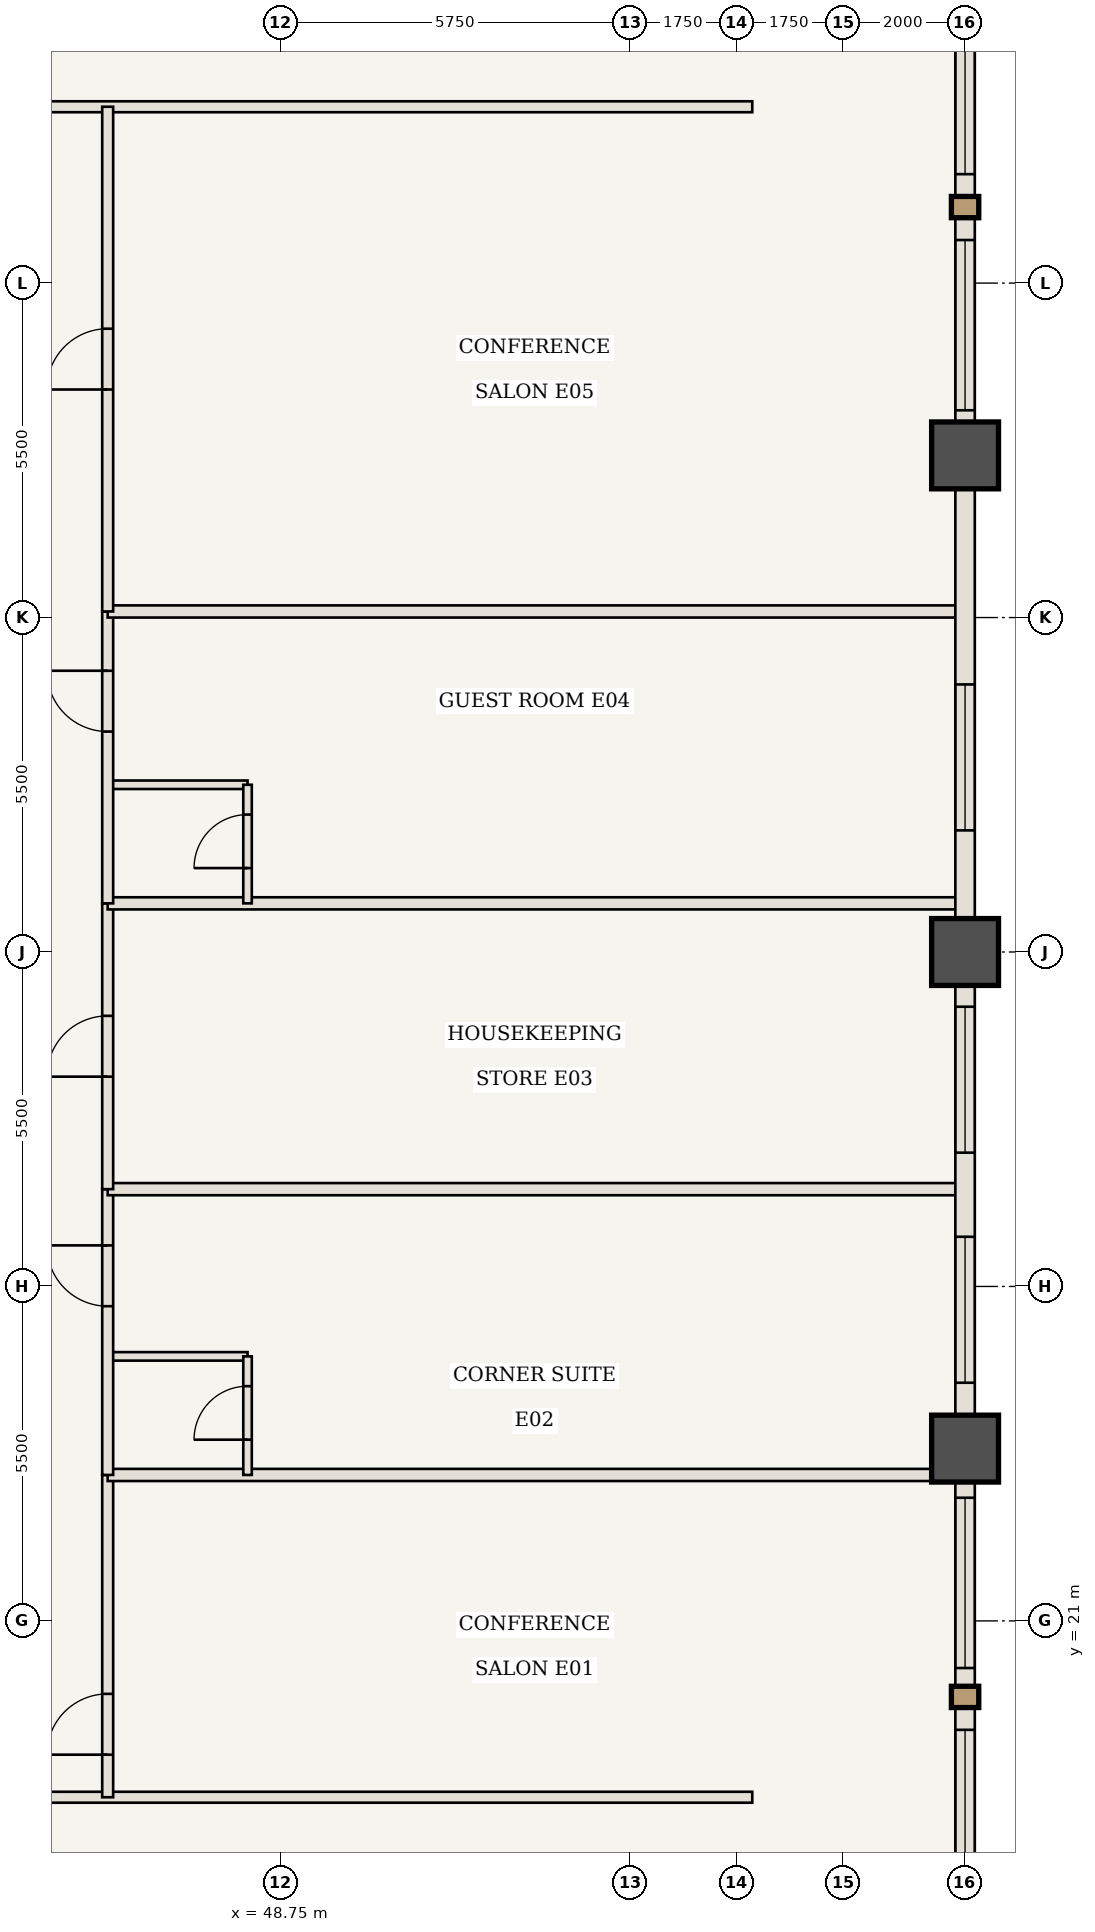
"""IFC4 building model, lengths in metres.
Left out: names, types, materials, properties, quantities, classifications, styles, units other than length and angle.
Written with IfcOpenShell. Run it as: python <this file> out.ifc"""

import sys

from ifc_helpers import new_model, si_unit, direction, frame, frame_2d, origin, origin_2d, place, context, subcontext, project, spatial, rectangle, extrude, element, fill, save


model = new_model("IFC4")
c1 = context("Model", 3, precision=1e-05, world=origin(), true_north=direction((0.0, 1.0)))
c2 = subcontext(c1, "Body", "Model", "MODEL_VIEW")
j1 = project(units=[si_unit("LENGTHUNIT", "METRE"), si_unit("PLANEANGLEUNIT", "RADIAN")], contexts=[c1])
p1 = place(None, origin())
s1 = spatial("IfcSite", under=j1, at=p1, CompositionType="ELEMENT")
p2 = place(p1, origin())
s2 = spatial("IfcBuilding", under=s1, at=p2, CompositionType="ELEMENT")
p3 = place(p2, frame((0.0, 0.0, 52.85)))
s3 = spatial("IfcBuildingStorey", under=s2, at=p3, CompositionType="ELEMENT", Elevation=52.85)
for number, where, z_axis, x_axis in (
    (1, (60.0, 23.833, 0.0), (0.0, 0.0, 1.0), (1.0, 0.0, 0.0)),
    (2, (60.0, 32.0, 0.0), (0.0, 0.0, 1.0), (1.0, 0.0, 0.0)),
    (3, (60.0, 40.167, 0.0), (0.0, 0.0, 1.0), (1.0, 0.0, 0.0)),
):
    element("IfcColumn", number, at=place(p3, frame(where, z_axis=z_axis, x_axis=x_axis)), inside=s3, PredefinedType="COLUMN", context=c2, shape_type="SweptSolid", body=[
        extrude(rectangle(XDim=1.1, YDim=1.1, at=origin_2d()), origin(), (0.0, 0.0, 1.0), 3.5),
    ])
p4 = place(p3, frame((34.5, 18.1, 0.0), z_axis=(0.0, 0.0, 1.0), x_axis=(1.0, 0.0, 0.0)))
e4 = element("IfcWall", 4, at=p4, inside=s3, PredefinedType="STANDARD", context=c2, shape_type="SweptSolid", body=[
    extrude(rectangle(XDim=22.0, YDim=0.18, at=frame_2d((11.0, 0.0))), origin(), (0.0, 0.0, 1.0), 3.32),
])
p5 = place(p4, frame((5.175, 0.0, 0.0)))
e5 = element("IfcOpeningElement", 5, at=p5, cuts=e4, PredefinedType="OPENING", context=c2, shape_type="SweptSolid", body=[
    extrude(rectangle(XDim=1.0, YDim=2.15, at=frame_2d((0.5, 1.075))), frame((0.0, 0.1, 0.0), z_axis=(0.0, -1.0, 0.0), x_axis=(1.0, 0.0, 0.0)), (0.0, 0.0, 1.0), 0.2),
])
p6 = place(p3, frame((38.0, 45.9, 0.0), z_axis=(0.0, 0.0, 1.0), x_axis=(1.0, 0.0, 0.0)))
e6 = element("IfcWall", 6, at=p6, inside=s3, PredefinedType="STANDARD", context=c2, shape_type="SweptSolid", body=[
    extrude(rectangle(XDim=18.5, YDim=0.18, at=frame_2d((9.25, 0.0))), origin(), (0.0, 0.0, 1.0), 3.32),
])
p7 = place(p6, frame((4.875, 0.0, 0.0)))
e7 = element("IfcOpeningElement", 7, at=p7, cuts=e6, PredefinedType="OPENING", context=c2, shape_type="SweptSolid", body=[
    extrude(rectangle(XDim=1.0, YDim=2.15, at=frame_2d((0.5, 1.075))), frame((0.0, 0.1, 0.0), z_axis=(0.0, -1.0, 0.0), x_axis=(1.0, 0.0, 0.0)), (0.0, 0.0, 1.0), 0.2),
])
p8 = place(p3, frame((45.9, 18.1, 0.0), z_axis=(0.0, 0.0, 1.0), x_axis=(0.0, 1.0, 0.0)))
e8 = element("IfcWall", 8, at=p8, inside=s3, PredefinedType="STANDARD", context=c2, shape_type="SweptSolid", body=[
    extrude(rectangle(XDim=5.3, YDim=0.18, at=frame_2d((2.65, 0.0))), origin(), (0.0, 0.0, 1.0), 3.32),
])
p9 = place(p8, frame((0.7, 0.0, 0.0)))
e9 = element("IfcOpeningElement", 9, at=p9, cuts=e8, PredefinedType="OPENING", context=c2, shape_type="SweptSolid", body=[
    extrude(rectangle(XDim=1.0, YDim=2.15, at=frame_2d((0.5, 1.075))), frame((0.0, 0.1, 0.0), z_axis=(0.0, -1.0, 0.0), x_axis=(1.0, 0.0, 0.0)), (0.0, 0.0, 1.0), 0.2),
])
p10 = place(p3, frame((45.9, 23.4, 0.0), z_axis=(0.0, 0.0, 1.0), x_axis=(1.0, 0.0, 0.0)))
e10 = element("IfcWall", 10, at=p10, inside=s3, PredefinedType="STANDARD", context=c2, shape_type="SweptSolid", body=[
    extrude(rectangle(XDim=14.04, YDim=0.2, at=frame_2d((7.02, 0.0))), origin(), (0.0, 0.0, 1.0), 3.32),
])
p11 = place(p3, frame((45.9, 25.35, 0.0), z_axis=(0.0, 0.0, 1.0), x_axis=(1.0, 0.0, 0.0)))
e11 = element("IfcWall", 11, at=p11, inside=s3, PredefinedType="STANDARD", context=c2, shape_type="SweptSolid", body=[
    extrude(rectangle(XDim=2.3, YDim=0.14, at=frame_2d((1.15, 0.0))), origin(), (0.0, 0.0, 1.0), 3.32),
])
p12 = place(p3, frame((48.2, 23.4, 0.0), z_axis=(0.0, 0.0, 1.0), x_axis=(0.0, 1.0, 0.0)))
e12 = element("IfcWall", 12, at=p12, inside=s3, PredefinedType="STANDARD", context=c2, shape_type="SweptSolid", body=[
    extrude(rectangle(XDim=1.95, YDim=0.14, at=frame_2d((0.975, 0.0))), origin(), (0.0, 0.0, 1.0), 3.32),
])
p13 = place(p12, frame((0.58, 0.0, 0.0)))
e13 = element("IfcOpeningElement", 13, at=p13, cuts=e12, PredefinedType="OPENING", context=c2, shape_type="SweptSolid", body=[
    extrude(rectangle(XDim=0.88, YDim=2.1, at=frame_2d((0.44, 1.05))), frame((0.0, 0.08, 0.0), z_axis=(0.0, -1.0, 0.0), x_axis=(1.0, 0.0, 0.0)), (0.0, 0.0, 1.0), 0.16),
])
p14 = place(p3, frame((45.9, 23.4, 0.0), z_axis=(0.0, 0.0, 1.0), x_axis=(0.0, 1.0, 0.0)))
e14 = element("IfcWall", 14, at=p14, inside=s3, PredefinedType="STANDARD", context=c2, shape_type="SweptSolid", body=[
    extrude(rectangle(XDim=4.7, YDim=0.18, at=frame_2d((2.35, 0.0))), origin(), (0.0, 0.0, 1.0), 3.32),
])
p15 = place(p14, frame((2.775, 0.0, 0.0)))
e15 = element("IfcOpeningElement", 15, at=p15, cuts=e14, PredefinedType="OPENING", context=c2, shape_type="SweptSolid", body=[
    extrude(rectangle(XDim=1.0, YDim=2.15, at=frame_2d((0.5, 1.075))), frame((0.0, 0.1, 0.0), z_axis=(0.0, -1.0, 0.0), x_axis=(1.0, 0.0, 0.0)), (0.0, 0.0, 1.0), 0.2),
])
p16 = place(p3, frame((45.9, 28.1, 0.0), z_axis=(0.0, 0.0, 1.0), x_axis=(1.0, 0.0, 0.0)))
e16 = element("IfcWall", 16, at=p16, inside=s3, PredefinedType="STANDARD", context=c2, shape_type="SweptSolid", body=[
    extrude(rectangle(XDim=14.04, YDim=0.2, at=frame_2d((7.02, 0.0))), origin(), (0.0, 0.0, 1.0), 3.32),
])
p17 = place(p3, frame((45.9, 28.1, 0.0), z_axis=(0.0, 0.0, 1.0), x_axis=(0.0, 1.0, 0.0)))
e17 = element("IfcWall", 17, at=p17, inside=s3, PredefinedType="STANDARD", context=c2, shape_type="SweptSolid", body=[
    extrude(rectangle(XDim=4.7, YDim=0.18, at=frame_2d((2.35, 0.0))), origin(), (0.0, 0.0, 1.0), 3.32),
])
p18 = place(p17, frame((1.85, 0.0, 0.0)))
e18 = element("IfcOpeningElement", 18, at=p18, cuts=e17, PredefinedType="OPENING", context=c2, shape_type="SweptSolid", body=[
    extrude(rectangle(XDim=1.0, YDim=2.15, at=frame_2d((0.5, 1.075))), frame((0.0, 0.1, 0.0), z_axis=(0.0, -1.0, 0.0), x_axis=(1.0, 0.0, 0.0)), (0.0, 0.0, 1.0), 0.2),
])
p19 = place(p3, frame((45.9, 32.8, 0.0), z_axis=(0.0, 0.0, 1.0), x_axis=(1.0, 0.0, 0.0)))
e19 = element("IfcWall", 19, at=p19, inside=s3, PredefinedType="STANDARD", context=c2, shape_type="SweptSolid", body=[
    extrude(rectangle(XDim=14.04, YDim=0.2, at=frame_2d((7.02, 0.0))), origin(), (0.0, 0.0, 1.0), 3.32),
])
p20 = place(p3, frame((45.9, 34.75, 0.0), z_axis=(0.0, 0.0, 1.0), x_axis=(1.0, 0.0, 0.0)))
e20 = element("IfcWall", 20, at=p20, inside=s3, PredefinedType="STANDARD", context=c2, shape_type="SweptSolid", body=[
    extrude(rectangle(XDim=2.3, YDim=0.14, at=frame_2d((1.15, 0.0))), origin(), (0.0, 0.0, 1.0), 3.32),
])
p21 = place(p3, frame((48.2, 32.8, 0.0), z_axis=(0.0, 0.0, 1.0), x_axis=(0.0, 1.0, 0.0)))
e21 = element("IfcWall", 21, at=p21, inside=s3, PredefinedType="STANDARD", context=c2, shape_type="SweptSolid", body=[
    extrude(rectangle(XDim=1.95, YDim=0.14, at=frame_2d((0.975, 0.0))), origin(), (0.0, 0.0, 1.0), 3.32),
])
p22 = place(p21, frame((0.58, 0.0, 0.0)))
e22 = element("IfcOpeningElement", 22, at=p22, cuts=e21, PredefinedType="OPENING", context=c2, shape_type="SweptSolid", body=[
    extrude(rectangle(XDim=0.88, YDim=2.1, at=frame_2d((0.44, 1.05))), frame((0.0, 0.08, 0.0), z_axis=(0.0, -1.0, 0.0), x_axis=(1.0, 0.0, 0.0)), (0.0, 0.0, 1.0), 0.16),
])
p23 = place(p3, frame((45.9, 32.8, 0.0), z_axis=(0.0, 0.0, 1.0), x_axis=(0.0, 1.0, 0.0)))
e23 = element("IfcWall", 23, at=p23, inside=s3, PredefinedType="STANDARD", context=c2, shape_type="SweptSolid", body=[
    extrude(rectangle(XDim=4.8, YDim=0.18, at=frame_2d((2.4, 0.0))), origin(), (0.0, 0.0, 1.0), 3.32),
])
p24 = place(p23, frame((2.825, 0.0, 0.0)))
e24 = element("IfcOpeningElement", 24, at=p24, cuts=e23, PredefinedType="OPENING", context=c2, shape_type="SweptSolid", body=[
    extrude(rectangle(XDim=1.0, YDim=2.15, at=frame_2d((0.5, 1.075))), frame((0.0, 0.1, 0.0), z_axis=(0.0, -1.0, 0.0), x_axis=(1.0, 0.0, 0.0)), (0.0, 0.0, 1.0), 0.2),
])
p25 = place(p3, frame((45.9, 37.6, 0.0), z_axis=(0.0, 0.0, 1.0), x_axis=(1.0, 0.0, 0.0)))
e25 = element("IfcWall", 25, at=p25, inside=s3, PredefinedType="STANDARD", context=c2, shape_type="SweptSolid", body=[
    extrude(rectangle(XDim=14.04, YDim=0.2, at=frame_2d((7.02, 0.0))), origin(), (0.0, 0.0, 1.0), 3.32),
])
p26 = place(p3, frame((45.9, 37.6, 0.0), z_axis=(0.0, 0.0, 1.0), x_axis=(0.0, 1.0, 0.0)))
e26 = element("IfcWall", 26, at=p26, inside=s3, PredefinedType="STANDARD", context=c2, shape_type="SweptSolid", body=[
    extrude(rectangle(XDim=8.3, YDim=0.18, at=frame_2d((4.15, 0.0))), origin(), (0.0, 0.0, 1.0), 3.32),
])
p27 = place(p26, frame((3.65, 0.0, 0.0)))
e27 = element("IfcOpeningElement", 27, at=p27, cuts=e26, PredefinedType="OPENING", context=c2, shape_type="SweptSolid", body=[
    extrude(rectangle(XDim=1.0, YDim=2.15, at=frame_2d((0.5, 1.075))), frame((0.0, 0.1, 0.0), z_axis=(0.0, -1.0, 0.0), x_axis=(1.0, 0.0, 0.0)), (0.0, 0.0, 1.0), 0.2),
])
p28 = place(p3, frame((60.0, 23.833, 0.0), z_axis=(0.0, 0.0, 1.0), x_axis=(0.0, -1.0, 0.0)))
e28 = element("IfcWall", 28, at=p28, inside=s3, PredefinedType="USERDEFINED", context=c2, shape_type="SweptSolid", body=[
    extrude(rectangle(XDim=8.167, YDim=0.32, at=frame_2d((4.083, 0.0))), origin(), (0.0, 0.0, 1.0), 2.52),
])
p29 = place(p28, frame((0.808, 0.0, 0.85)))
e29 = element("IfcOpeningElement", 29, at=p29, cuts=e28, PredefinedType="OPENING", context=c2, shape_type="SweptSolid", body=[
    extrude(rectangle(XDim=2.8, YDim=1.47, at=frame_2d((1.4, 0.735))), frame((0.0, 0.17, 0.0), z_axis=(0.0, -1.0, 0.0), x_axis=(1.0, 0.0, 0.0)), (0.0, 0.0, 1.0), 0.34),
])
p30 = place(p28, frame((4.625, 0.0, 0.85)))
e30 = element("IfcOpeningElement", 30, at=p30, cuts=e28, PredefinedType="OPENING", context=c2, shape_type="SweptSolid", body=[
    extrude(rectangle(XDim=2.8, YDim=1.47, at=frame_2d((1.4, 0.735))), frame((0.0, 0.17, 0.0), z_axis=(0.0, -1.0, 0.0), x_axis=(1.0, 0.0, 0.0)), (0.0, 0.0, 1.0), 0.34),
])
p31 = place(p3, frame((60.0, 32.0, 0.0), z_axis=(0.0, 0.0, 1.0), x_axis=(0.0, -1.0, 0.0)))
e31 = element("IfcWall", 31, at=p31, inside=s3, PredefinedType="USERDEFINED", context=c2, shape_type="SweptSolid", body=[
    extrude(rectangle(XDim=8.167, YDim=0.32, at=frame_2d((4.083, 0.0))), origin(), (0.0, 0.0, 1.0), 2.52),
])
p32 = place(p31, frame((0.9, 0.0, 0.85)))
e32 = element("IfcOpeningElement", 32, at=p32, cuts=e31, PredefinedType="OPENING", context=c2, shape_type="SweptSolid", body=[
    extrude(rectangle(XDim=2.4, YDim=1.47, at=frame_2d((1.2, 0.735))), frame((0.0, 0.17, 0.0), z_axis=(0.0, -1.0, 0.0), x_axis=(1.0, 0.0, 0.0)), (0.0, 0.0, 1.0), 0.34),
])
p33 = place(p31, frame((4.683, 0.0, 0.85)))
e33 = element("IfcOpeningElement", 33, at=p33, cuts=e31, PredefinedType="OPENING", context=c2, shape_type="SweptSolid", body=[
    extrude(rectangle(XDim=2.4, YDim=1.47, at=frame_2d((1.2, 0.735))), frame((0.0, 0.17, 0.0), z_axis=(0.0, -1.0, 0.0), x_axis=(1.0, 0.0, 0.0)), (0.0, 0.0, 1.0), 0.34),
])
p34 = place(p3, frame((60.0, 40.167, 0.0), z_axis=(0.0, 0.0, 1.0), x_axis=(0.0, -1.0, 0.0)))
e34 = element("IfcWall", 34, at=p34, inside=s3, PredefinedType="USERDEFINED", context=c2, shape_type="SweptSolid", body=[
    extrude(rectangle(XDim=8.167, YDim=0.32, at=frame_2d((4.083, 0.0))), origin(), (0.0, 0.0, 1.0), 2.52),
])
p35 = place(p34, frame((3.767, 0.0, 0.85)))
e35 = element("IfcOpeningElement", 35, at=p35, cuts=e34, PredefinedType="OPENING", context=c2, shape_type="SweptSolid", body=[
    extrude(rectangle(XDim=2.4, YDim=1.47, at=frame_2d((1.2, 0.735))), frame((0.0, 0.17, 0.0), z_axis=(0.0, -1.0, 0.0), x_axis=(1.0, 0.0, 0.0)), (0.0, 0.0, 1.0), 0.34),
])
p36 = place(p3, frame((60.0, 48.333, 0.0), z_axis=(0.0, 0.0, 1.0), x_axis=(0.0, -1.0, 0.0)))
e36 = element("IfcWall", 36, at=p36, inside=s3, PredefinedType="USERDEFINED", context=c2, shape_type="SweptSolid", body=[
    extrude(rectangle(XDim=8.167, YDim=0.32, at=frame_2d((4.083, 0.0))), origin(), (0.0, 0.0, 1.0), 2.52),
])
p37 = place(p36, frame((0.742, 0.0, 0.85)))
e37 = element("IfcOpeningElement", 37, at=p37, cuts=e36, PredefinedType="OPENING", context=c2, shape_type="SweptSolid", body=[
    extrude(rectangle(XDim=2.8, YDim=1.47, at=frame_2d((1.4, 0.735))), frame((0.0, 0.17, 0.0), z_axis=(0.0, -1.0, 0.0), x_axis=(1.0, 0.0, 0.0)), (0.0, 0.0, 1.0), 0.34),
])
p38 = place(p36, frame((4.625, 0.0, 0.85)))
e38 = element("IfcOpeningElement", 38, at=p38, cuts=e36, PredefinedType="OPENING", context=c2, shape_type="SweptSolid", body=[
    extrude(rectangle(XDim=2.8, YDim=1.47, at=frame_2d((1.4, 0.735))), frame((0.0, 0.17, 0.0), z_axis=(0.0, -1.0, 0.0), x_axis=(1.0, 0.0, 0.0)), (0.0, 0.0, 1.0), 0.34),
])
p39 = place(p9, origin())
e39 = element("IfcDoor", 39, at=p39, inside=s3, OperationType="SINGLE_SWING_LEFT", PredefinedType="DOOR", context=c2, shape_type="SweptSolid", body=[
    extrude(rectangle(XDim=1.0, YDim=2.15, at=frame_2d((0.5, 1.075))), frame((0.0, 0.025, 0.0), z_axis=(0.0, -1.0, 0.0), x_axis=(1.0, 0.0, 0.0)), (0.0, 0.0, 1.0), 0.05),
])
fill(e9, e39)
p40 = place(p13, origin())
e40 = element("IfcDoor", 40, at=p40, inside=s3, OperationType="SINGLE_SWING_LEFT", PredefinedType="DOOR", context=c2, shape_type="SweptSolid", body=[
    extrude(rectangle(XDim=0.88, YDim=2.1, at=frame_2d((0.44, 1.05))), frame((0.0, 0.025, 0.0), z_axis=(0.0, -1.0, 0.0), x_axis=(1.0, 0.0, 0.0)), (0.0, 0.0, 1.0), 0.05),
])
fill(e13, e40)
p41 = place(p15, origin())
e41 = element("IfcDoor", 41, at=p41, inside=s3, OperationType="SINGLE_SWING_RIGHT", PredefinedType="DOOR", context=c2, shape_type="SweptSolid", body=[
    extrude(rectangle(XDim=1.0, YDim=2.15, at=frame_2d((0.5, 1.075))), frame((0.0, 0.025, 0.0), z_axis=(0.0, -1.0, 0.0), x_axis=(1.0, 0.0, 0.0)), (0.0, 0.0, 1.0), 0.05),
])
fill(e15, e41)
p42 = place(p18, origin())
e42 = element("IfcDoor", 42, at=p42, inside=s3, OperationType="SINGLE_SWING_LEFT", PredefinedType="DOOR", context=c2, shape_type="SweptSolid", body=[
    extrude(rectangle(XDim=1.0, YDim=2.15, at=frame_2d((0.5, 1.075))), frame((0.0, 0.025, 0.0), z_axis=(0.0, -1.0, 0.0), x_axis=(1.0, 0.0, 0.0)), (0.0, 0.0, 1.0), 0.05),
])
fill(e18, e42)
p43 = place(p22, origin())
e43 = element("IfcDoor", 43, at=p43, inside=s3, OperationType="SINGLE_SWING_LEFT", PredefinedType="DOOR", context=c2, shape_type="SweptSolid", body=[
    extrude(rectangle(XDim=0.88, YDim=2.1, at=frame_2d((0.44, 1.05))), frame((0.0, 0.025, 0.0), z_axis=(0.0, -1.0, 0.0), x_axis=(1.0, 0.0, 0.0)), (0.0, 0.0, 1.0), 0.05),
])
fill(e22, e43)
p44 = place(p24, origin())
e44 = element("IfcDoor", 44, at=p44, inside=s3, OperationType="SINGLE_SWING_RIGHT", PredefinedType="DOOR", context=c2, shape_type="SweptSolid", body=[
    extrude(rectangle(XDim=1.0, YDim=2.15, at=frame_2d((0.5, 1.075))), frame((0.0, 0.025, 0.0), z_axis=(0.0, -1.0, 0.0), x_axis=(1.0, 0.0, 0.0)), (0.0, 0.0, 1.0), 0.05),
])
fill(e24, e44)
p45 = place(p27, origin())
e45 = element("IfcDoor", 45, at=p45, inside=s3, OperationType="SINGLE_SWING_LEFT", PredefinedType="DOOR", context=c2, shape_type="SweptSolid", body=[
    extrude(rectangle(XDim=1.0, YDim=2.15, at=frame_2d((0.5, 1.075))), frame((0.0, 0.025, 0.0), z_axis=(0.0, -1.0, 0.0), x_axis=(1.0, 0.0, 0.0)), (0.0, 0.0, 1.0), 0.05),
])
fill(e27, e45)
p46 = place(p29, origin())
e46 = element("IfcWindow", 46, at=p46, inside=s3, PartitioningType="SINGLE_PANEL", PredefinedType="WINDOW", context=c2, shape_type="SweptSolid", body=[
    extrude(rectangle(XDim=2.8, YDim=1.47, at=frame_2d((1.4, 0.735))), frame((0.0, 0.03, 0.0), z_axis=(0.0, -1.0, 0.0), x_axis=(1.0, 0.0, 0.0)), (0.0, 0.0, 1.0), 0.06),
])
fill(e29, e46)
p47 = place(p30, origin())
e47 = element("IfcWindow", 47, at=p47, inside=s3, PartitioningType="SINGLE_PANEL", PredefinedType="WINDOW", context=c2, shape_type="SweptSolid", body=[
    extrude(rectangle(XDim=2.8, YDim=1.47, at=frame_2d((1.4, 0.735))), frame((0.0, 0.03, 0.0), z_axis=(0.0, -1.0, 0.0), x_axis=(1.0, 0.0, 0.0)), (0.0, 0.0, 1.0), 0.06),
])
fill(e30, e47)
p48 = place(p32, origin())
e48 = element("IfcWindow", 48, at=p48, inside=s3, PartitioningType="SINGLE_PANEL", PredefinedType="WINDOW", context=c2, shape_type="SweptSolid", body=[
    extrude(rectangle(XDim=2.4, YDim=1.47, at=frame_2d((1.2, 0.735))), frame((0.0, 0.03, 0.0), z_axis=(0.0, -1.0, 0.0), x_axis=(1.0, 0.0, 0.0)), (0.0, 0.0, 1.0), 0.06),
])
fill(e32, e48)
p49 = place(p33, origin())
e49 = element("IfcWindow", 49, at=p49, inside=s3, PartitioningType="SINGLE_PANEL", PredefinedType="WINDOW", context=c2, shape_type="SweptSolid", body=[
    extrude(rectangle(XDim=2.4, YDim=1.47, at=frame_2d((1.2, 0.735))), frame((0.0, 0.03, 0.0), z_axis=(0.0, -1.0, 0.0), x_axis=(1.0, 0.0, 0.0)), (0.0, 0.0, 1.0), 0.06),
])
fill(e33, e49)
p50 = place(p35, origin())
e50 = element("IfcWindow", 50, at=p50, inside=s3, PartitioningType="SINGLE_PANEL", PredefinedType="WINDOW", context=c2, shape_type="SweptSolid", body=[
    extrude(rectangle(XDim=2.4, YDim=1.47, at=frame_2d((1.2, 0.735))), frame((0.0, 0.03, 0.0), z_axis=(0.0, -1.0, 0.0), x_axis=(1.0, 0.0, 0.0)), (0.0, 0.0, 1.0), 0.06),
])
fill(e35, e50)
p51 = place(p37, origin())
e51 = element("IfcWindow", 51, at=p51, inside=s3, PartitioningType="SINGLE_PANEL", PredefinedType="WINDOW", context=c2, shape_type="SweptSolid", body=[
    extrude(rectangle(XDim=2.8, YDim=1.47, at=frame_2d((1.4, 0.735))), frame((0.0, 0.03, 0.0), z_axis=(0.0, -1.0, 0.0), x_axis=(1.0, 0.0, 0.0)), (0.0, 0.0, 1.0), 0.06),
])
fill(e37, e51)
p52 = place(p38, origin())
e52 = element("IfcWindow", 52, at=p52, inside=s3, PartitioningType="SINGLE_PANEL", PredefinedType="WINDOW", context=c2, shape_type="SweptSolid", body=[
    extrude(rectangle(XDim=2.8, YDim=1.47, at=frame_2d((1.4, 0.735))), frame((0.0, 0.03, 0.0), z_axis=(0.0, -1.0, 0.0), x_axis=(1.0, 0.0, 0.0)), (0.0, 0.0, 1.0), 0.06),
])
fill(e38, e52)
save(model, sys.argv[1])
